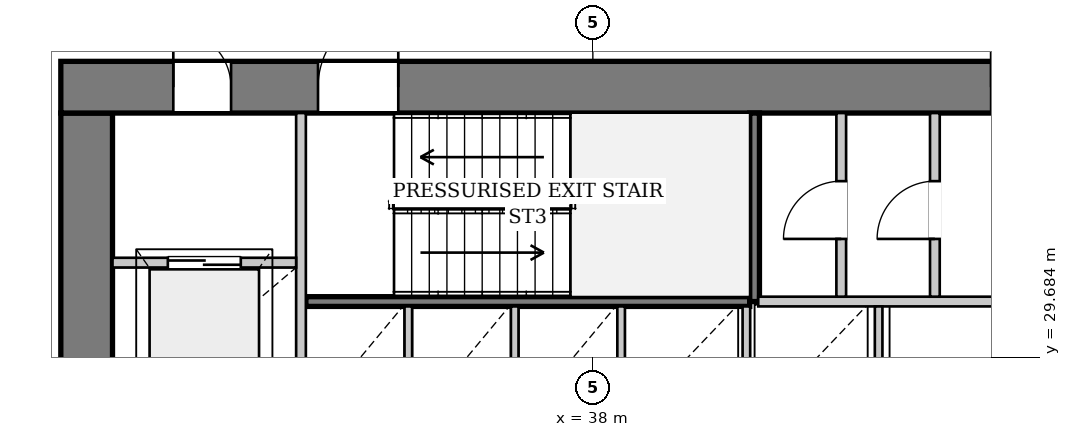
"""IFC4 building model, lengths in metres.
Left out: names, types, materials, properties, quantities, classifications, styles, units other than length and angle.
Written with IfcOpenShell. Run it as: python <this file> out.ifc"""

import sys

from ifc_helpers import new_model, si_unit, direction, frame, frame_2d, origin, place, context, subcontext, project, spatial, rectangle, extrude, source, transform, mapped, element, fill, save


model = new_model("IFC4")
c1 = context("Model", 3, precision=1e-05, world=origin(), true_north=direction((0.0, 1.0)))
c2 = subcontext(c1, "Body", "Model", "MODEL_VIEW")
j1 = project(units=[si_unit("LENGTHUNIT", "METRE"), si_unit("PLANEANGLEUNIT", "RADIAN")], contexts=[c1])
p1 = place(None, origin())
s1 = spatial("IfcSite", under=j1, at=p1, CompositionType="ELEMENT")
p2 = place(p1, origin())
s2 = spatial("IfcBuilding", under=s1, at=p2, CompositionType="ELEMENT")
p3 = place(p2, frame((0.0, 0.0, 32.85)))
s3 = spatial("IfcBuildingStorey", under=s2, at=p3, CompositionType="ELEMENT", Elevation=32.85)
p4 = place(p3, frame((29.675, 19.5, 0.0), z_axis=(0.0, 0.0, 1.0), x_axis=(0.0, 1.0, 0.0)))
e1 = element("IfcWall", 1, at=p4, inside=s3, PredefinedType="SHEAR", context=c2, shape_type="SweptSolid", body=[
    extrude(rectangle(XDim=14.2, YDim=0.85, at=frame_2d((7.1, 0.0))), origin(), (0.0, 0.0, 1.0), 3.3),
])
p5 = place(p4, frame((7.42, 0.0, 0.0)))
e2 = element("IfcOpeningElement", 2, at=p5, cuts=e1, PredefinedType="OPENING", context=c2, shape_type="SweptSolid", body=[
    extrude(rectangle(XDim=1.6, YDim=2.2, at=frame_2d((0.8, 1.1))), frame((0.0, 0.435, 0.0), z_axis=(0.0, -1.0, 0.0), x_axis=(1.0, 0.0, 0.0)), (0.0, 0.0, 1.0), 0.87),
])
p6 = place(p3, frame((29.25, 34.125, 0.0), z_axis=(0.0, 0.0, 1.0), x_axis=(1.0, 0.0, 0.0)))
e3 = element("IfcWall", 3, at=p6, inside=s3, PredefinedType="SHEAR", context=c2, shape_type="SweptSolid", body=[
    extrude(rectangle(XDim=17.5, YDim=0.85, at=frame_2d((8.75, 0.0))), origin(), (0.0, 0.0, 1.0), 3.3),
])
p7 = place(p6, frame((1.85, 0.0, 0.0)))
e4 = element("IfcOpeningElement", 4, at=p7, cuts=e3, PredefinedType="OPENING", context=c2, shape_type="SweptSolid", body=[
    extrude(rectangle(XDim=0.95, YDim=2.1, at=frame_2d((0.475, 1.05))), frame((0.0, 0.435, 0.0), z_axis=(0.0, -1.0, 0.0), x_axis=(1.0, 0.0, 0.0)), (0.0, 0.0, 1.0), 0.87),
])
p8 = place(p6, frame((4.23, 0.0, 0.0)))
e5 = element("IfcOpeningElement", 5, at=p8, cuts=e3, PredefinedType="OPENING", context=c2, shape_type="SweptSolid", body=[
    extrude(rectangle(XDim=1.32, YDim=2.2, at=frame_2d((0.66, 1.1))), frame((0.0, 0.435, 0.0), z_axis=(0.0, -1.0, 0.0), x_axis=(1.0, 0.0, 0.0)), (0.0, 0.0, 1.0), 0.87),
])
p9 = place(p6, frame((15.3, 0.0, 0.0)))
e6 = element("IfcOpeningElement", 6, at=p9, cuts=e3, PredefinedType="OPENING", context=c2, shape_type="SweptSolid", body=[
    extrude(rectangle(XDim=0.95, YDim=2.1, at=frame_2d((0.475, 1.05))), frame((0.0, 0.435, 0.0), z_axis=(0.0, -1.0, 0.0), x_axis=(1.0, 0.0, 0.0)), (0.0, 0.0, 1.0), 0.87),
])
p10 = place(p3, frame((33.28, 30.6, 0.0), z_axis=(0.0, 0.0, 1.0), x_axis=(1.0, 0.0, 0.0)))
e7 = element("IfcWall", 7, at=p10, inside=s3, PredefinedType="PARTITIONING", context=c2, shape_type="SweptSolid", body=[
    extrude(rectangle(XDim=7.3, YDim=0.16, at=frame_2d((3.65, 0.0))), origin(), (0.0, 0.0, 1.0), 3.3),
])
p11 = place(p3, frame((40.66, 30.6, 0.0), z_axis=(0.0, 0.0, 1.0), x_axis=(0.0, 1.0, 0.0)))
e8 = element("IfcWall", 8, at=p11, inside=s3, PredefinedType="PARTITIONING", context=c2, shape_type="SweptSolid", body=[
    extrude(rectangle(XDim=3.1, YDim=0.16, at=frame_2d((1.55, 0.0))), origin(), (0.0, 0.0, 1.0), 3.3),
])
p12 = place(p3, frame((33.2, 28.44, 0.0), z_axis=(0.0, 0.0, 1.0), x_axis=(0.0, 1.0, 0.0)))
e9 = element("IfcWall", 9, at=p12, inside=s3, PredefinedType="PARTITIONING", context=c2, shape_type="SweptSolid", body=[
    extrude(rectangle(XDim=5.26, YDim=0.16, at=frame_2d((2.63, 0.0))), origin(), (0.0, 0.0, 1.0), 3.3),
])
p13 = place(p3, frame((30.1, 31.24, 0.0), z_axis=(0.0, 0.0, 1.0), x_axis=(1.0, 0.0, 0.0)))
e10 = element("IfcWall", 10, at=p13, inside=s3, PredefinedType="PARTITIONING", context=c2, shape_type="SweptSolid", body=[
    extrude(rectangle(XDim=3.02, YDim=0.16, at=frame_2d((1.51, 0.0))), origin(), (0.0, 0.0, 1.0), 3.3),
])
p14 = place(p13, frame((0.91, 0.0, 0.0)))
e11 = element("IfcOpeningElement", 11, at=p14, cuts=e10, PredefinedType="OPENING", context=c2, shape_type="SweptSolid", body=[
    extrude(rectangle(XDim=1.2, YDim=2.2, at=frame_2d((0.6, 1.1))), frame((0.0, 0.09, 0.0), z_axis=(0.0, -1.0, 0.0), x_axis=(1.0, 0.0, 0.0)), (0.0, 0.0, 1.0), 0.18),
])
p15 = place(p3, frame((40.72, 30.6, 0.0), z_axis=(0.0, 0.0, 1.0), x_axis=(1.0, 0.0, 0.0)))
e12 = element("IfcWall", 12, at=p15, inside=s3, PredefinedType="PARTITIONING", context=c2, shape_type="SweptSolid", body=[
    extrude(rectangle(XDim=5.18, YDim=0.16, at=frame_2d((2.59, 0.0))), origin(), (0.0, 0.0, 1.0), 3.3),
])
for number, where, z_axis, x_axis in (
    (13, (34.965, 28.6, 0.0), (0.0, 0.0, 1.0), (0.0, 1.0, 0.0)),
    (14, (36.715, 28.6, 0.0), (0.0, 0.0, 1.0), (0.0, 1.0, 0.0)),
    (15, (38.465, 28.6, 0.0), (0.0, 0.0, 1.0), (0.0, 1.0, 0.0)),
    (16, (40.525, 28.6, 0.0), (0.0, 0.0, 1.0), (0.0, 1.0, 0.0)),
    (17, (42.7, 28.6, 0.0), (0.0, 0.0, 1.0), (0.0, 1.0, 0.0)),
):
    element("IfcWall", number, at=place(p3, frame(where, z_axis=z_axis, x_axis=x_axis)), inside=s3, PredefinedType="PARTITIONING", context=c2, shape_type="SweptSolid", body=[
        extrude(rectangle(XDim=1.92, YDim=0.125, at=frame_2d((0.96, 0.0))), origin(), (0.0, 0.0, 1.0), 3.3),
    ])
p16 = place(p3, frame((42.085, 30.68, 0.0), z_axis=(0.0, 0.0, 1.0), x_axis=(0.0, 1.0, 0.0)))
e18 = element("IfcWall", 18, at=p16, inside=s3, PredefinedType="PARTITIONING", context=c2, shape_type="SweptSolid", body=[
    extrude(rectangle(XDim=3.02, YDim=0.16, at=frame_2d((1.51, 0.0))), origin(), (0.0, 0.0, 1.0), 3.3),
])
p17 = place(p16, frame((0.95, 0.0, 0.0)))
e19 = element("IfcOpeningElement", 19, at=p17, cuts=e18, PredefinedType="OPENING", context=c2, shape_type="SweptSolid", body=[
    extrude(rectangle(XDim=0.95, YDim=2.1, at=frame_2d((0.475, 1.05))), frame((0.0, 0.09, 0.0), z_axis=(0.0, -1.0, 0.0), x_axis=(1.0, 0.0, 0.0)), (0.0, 0.0, 1.0), 0.18),
])
p18 = place(p3, frame((43.625, 30.68, 0.0), z_axis=(0.0, 0.0, 1.0), x_axis=(0.0, 1.0, 0.0)))
e20 = element("IfcWall", 20, at=p18, inside=s3, PredefinedType="PARTITIONING", context=c2, shape_type="SweptSolid", body=[
    extrude(rectangle(XDim=3.02, YDim=0.16, at=frame_2d((1.51, 0.0))), origin(), (0.0, 0.0, 1.0), 3.3),
])
p19 = place(p18, frame((0.95, 0.0, 0.0)))
e21 = element("IfcOpeningElement", 21, at=p19, cuts=e20, PredefinedType="OPENING", context=c2, shape_type="SweptSolid", body=[
    extrude(rectangle(XDim=0.95, YDim=2.1, at=frame_2d((0.475, 1.05))), frame((0.0, 0.09, 0.0), z_axis=(0.0, -1.0, 0.0), x_axis=(1.0, 0.0, 0.0)), (0.0, 0.0, 1.0), 0.18),
])
m1 = source(origin(), c2, "Body", "SweptSolid", [
    extrude(rectangle(XDim=0.95, YDim=2.1, at=frame_2d((0.475, 1.05))), frame((0.0, 0.025, 0.0), z_axis=(0.0, -1.0, 0.0), x_axis=(1.0, 0.0, 0.0)), (0.0, 0.0, 1.0), 0.05),
])
p20 = place(p7, origin())
e22 = element("IfcDoor", 22, at=p20, inside=s3, OperationType="SINGLE_SWING_LEFT", PredefinedType="DOOR", context=c2, shape_type="MappedRepresentation", body=[
    mapped(m1, transform((0.0, 0.0, 0.0), x_axis=(1.0, 0.0, 0.0), y_axis=(0.0, 1.0, 0.0), z_axis=(0.0, 0.0, 1.0), scale=1.0)),
])
fill(e4, e22)
m2 = source(origin(), c2, "Body", "SweptSolid", [
    extrude(rectangle(XDim=1.32, YDim=2.2, at=frame_2d((0.66, 1.1))), frame((0.0, 0.025, 0.0), z_axis=(0.0, -1.0, 0.0), x_axis=(1.0, 0.0, 0.0)), (0.0, 0.0, 1.0), 0.05),
])
p21 = place(p8, origin())
e23 = element("IfcDoor", 23, at=p21, inside=s3, OperationType="SINGLE_SWING_RIGHT", PredefinedType="DOOR", context=c2, shape_type="MappedRepresentation", body=[
    mapped(m2, transform((0.0, 0.0, 0.0), x_axis=(1.0, 0.0, 0.0), y_axis=(0.0, 1.0, 0.0), z_axis=(0.0, 0.0, 1.0), scale=1.0)),
])
fill(e5, e23)
m3 = source(origin(), c2, "Body", "SweptSolid", [
    extrude(rectangle(XDim=1.2, YDim=2.2, at=frame_2d((0.6, 1.1))), frame((0.0, 0.025, 0.0), z_axis=(0.0, -1.0, 0.0), x_axis=(1.0, 0.0, 0.0)), (0.0, 0.0, 1.0), 0.05),
])
p22 = place(p14, origin())
e24 = element("IfcDoor", 24, at=p22, inside=s3, OperationType="DOUBLE_DOOR_SLIDING", PredefinedType="DOOR", context=c2, shape_type="MappedRepresentation", body=[
    mapped(m3, transform((0.0, 0.0, 0.0), x_axis=(1.0, 0.0, 0.0), y_axis=(0.0, 1.0, 0.0), z_axis=(0.0, 0.0, 1.0), scale=1.0)),
])
fill(e11, e24)
p23 = place(p17, origin())
e25 = element("IfcDoor", 25, at=p23, inside=s3, OperationType="SINGLE_SWING_LEFT", PredefinedType="DOOR", context=c2, shape_type="MappedRepresentation", body=[
    mapped(m1, transform((0.0, 0.0, 0.0), x_axis=(1.0, 0.0, 0.0), y_axis=(0.0, 1.0, 0.0), z_axis=(0.0, 0.0, 1.0), scale=1.0)),
])
fill(e19, e25)
p24 = place(p19, origin())
e26 = element("IfcDoor", 26, at=p24, inside=s3, OperationType="SINGLE_SWING_LEFT", PredefinedType="DOOR", context=c2, shape_type="MappedRepresentation", body=[
    mapped(m1, transform((0.0, 0.0, 0.0), x_axis=(1.0, 0.0, 0.0), y_axis=(0.0, 1.0, 0.0), z_axis=(0.0, 0.0, 1.0), scale=1.0)),
])
fill(e21, e26)
save(model, sys.argv[1])
